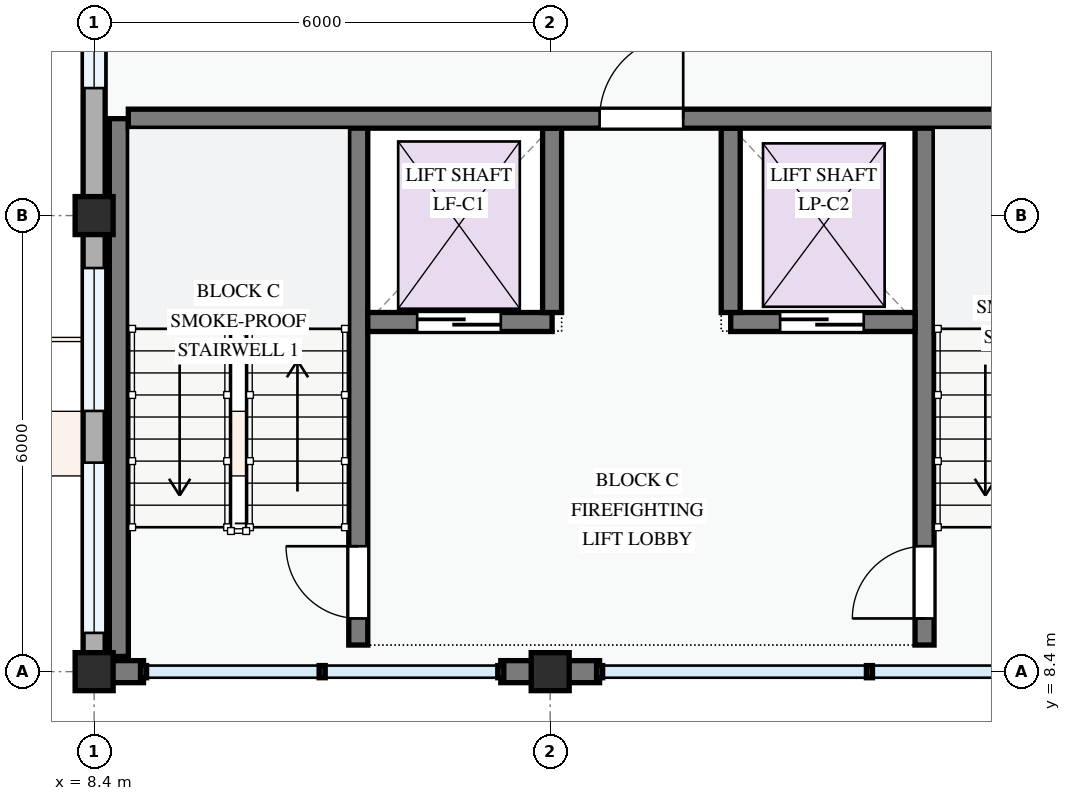
"""IFC4 building model, lengths in metres.
Left out: names, types, materials, properties, quantities, classifications, styles, units other than length and angle.
Written with IfcOpenShell. Run it as: python <this file> out.ifc"""

import sys

from ifc_helpers import new_model, si_unit, direction, frame, frame_2d, origin, origin_2d, place, context, subcontext, project, spatial, rectangle, extrude, element, fill, save


model = new_model("IFC4")
c1 = context("Model", 3, precision=1e-05, world=origin(), true_north=direction((0.0, 1.0)))
c2 = subcontext(c1, "Body", "Model", "MODEL_VIEW")
j1 = project(units=[si_unit("LENGTHUNIT", "METRE"), si_unit("PLANEANGLEUNIT", "RADIAN")], contexts=[c1])
p1 = place(None, origin())
s1 = spatial("IfcSite", under=j1, at=p1, CompositionType="ELEMENT")
p2 = place(p1, origin())
s2 = spatial("IfcBuilding", under=s1, at=p2, CompositionType="ELEMENT")
p3 = place(p2, frame((0.0, 0.0, 21.3)))
s3 = spatial("IfcBuildingStorey", under=s2, at=p3, CompositionType="ELEMENT", Elevation=21.3)
for number, where, z_axis, x_axis in (
    (1, (8.4, 8.4, 0.0), (0.0, 0.0, 1.0), (1.0, 0.0, 0.0)),
    (2, (8.4, 14.4, 0.0), (0.0, 0.0, 1.0), (1.0, 0.0, 0.0)),
    (3, (14.4, 8.4, 0.0), (0.0, 0.0, 1.0), (1.0, 0.0, 0.0)),
):
    element("IfcColumn", number, at=place(p3, frame(where, z_axis=z_axis, x_axis=x_axis)), inside=s3, PredefinedType="COLUMN", context=c2, shape_type="SweptSolid", body=[
        extrude(rectangle(XDim=0.5, YDim=0.5, at=origin_2d()), origin(), (0.0, 0.0, 1.0), 3.3),
    ])
p4 = place(p3, frame((8.4, 22.8, 0.0), z_axis=(0.0, 0.0, 1.0), x_axis=(0.0, -1.0, 0.0)))
e4 = element("IfcWall", 4, at=p4, inside=s3, PredefinedType="STANDARD", context=c2, shape_type="SweptSolid", body=[
    extrude(rectangle(XDim=8.4, YDim=0.29, at=frame_2d((4.2, 0.0))), origin(), (0.0, 0.0, 1.0), 2.345),
])
p5 = place(p4, frame((1.695, 0.0, 0.78)))
e5 = element("IfcOpeningElement", 5, at=p5, cuts=e4, PredefinedType="OPENING", context=c2, shape_type="SweptSolid", body=[
    extrude(rectangle(XDim=1.0, YDim=1.25, at=frame_2d((0.5, 0.625))), frame((0.0, 0.155, 0.0), z_axis=(0.0, -1.0, 0.0), x_axis=(1.0, 0.0, 0.0)), (0.0, 0.0, 1.0), 0.31),
])
p6 = place(p4, frame((4.603, 0.0, 0.78)))
e6 = element("IfcOpeningElement", 6, at=p6, cuts=e4, PredefinedType="OPENING", context=c2, shape_type="SweptSolid", body=[
    extrude(rectangle(XDim=2.12, YDim=1.44, at=frame_2d((1.06, 0.72))), frame((0.0, 0.155, 0.0), z_axis=(0.0, -1.0, 0.0), x_axis=(1.0, 0.0, 0.0)), (0.0, 0.0, 1.0), 0.31),
])
p7 = place(p3, frame((8.4, 14.4, 0.0), z_axis=(0.0, 0.0, 1.0), x_axis=(0.0, -1.0, 0.0)))
e7 = element("IfcWall", 7, at=p7, inside=s3, PredefinedType="STANDARD", context=c2, shape_type="SweptSolid", body=[
    extrude(rectangle(XDim=6.0, YDim=0.29, at=frame_2d((3.0, 0.0))), origin(), (0.0, 0.0, 1.0), 2.445),
])
p8 = place(p7, frame((0.69, 0.0, 0.78)))
e8 = element("IfcOpeningElement", 8, at=p8, cuts=e7, PredefinedType="OPENING", context=c2, shape_type="SweptSolid", body=[
    extrude(rectangle(XDim=1.88, YDim=1.52, at=frame_2d((0.94, 0.76))), frame((0.0, 0.155, 0.0), z_axis=(0.0, -1.0, 0.0), x_axis=(1.0, 0.0, 0.0)), (0.0, 0.0, 1.0), 0.31),
])
p9 = place(p7, frame((3.25, 0.0, 0.78)))
e9 = element("IfcOpeningElement", 9, at=p9, cuts=e7, PredefinedType="OPENING", context=c2, shape_type="SweptSolid", body=[
    extrude(rectangle(XDim=2.24, YDim=1.52, at=frame_2d((1.12, 0.76))), frame((0.0, 0.155, 0.0), z_axis=(0.0, -1.0, 0.0), x_axis=(1.0, 0.0, 0.0)), (0.0, 0.0, 1.0), 0.31),
])
p10 = place(p3, frame((8.547, 8.4, 0.0), z_axis=(0.0, 0.0, 1.0), x_axis=(1.0, 0.0, 0.0)))
e10 = element("IfcWall", 10, at=p10, inside=s3, PredefinedType="STANDARD", context=c2, shape_type="SweptSolid", body=[
    extrude(rectangle(XDim=0.503, YDim=0.29, at=frame_2d((0.251, 0.0))), origin(), (0.0, 0.0, 1.0), 3.04),
])
p11 = place(p3, frame((13.75, 8.4, 0.0), z_axis=(0.0, 0.0, 1.0), x_axis=(1.0, 0.0, 0.0)))
e11 = element("IfcWall", 11, at=p11, inside=s3, PredefinedType="STANDARD", context=c2, shape_type="SweptSolid", body=[
    extrude(rectangle(XDim=0.65, YDim=0.29, at=frame_2d((0.325, 0.0))), origin(), (0.0, 0.0, 1.0), 3.04),
])
p12 = place(p3, frame((14.4, 8.4, 0.0), z_axis=(0.0, 0.0, 1.0), x_axis=(1.0, 0.0, 0.0)))
e12 = element("IfcWall", 12, at=p12, inside=s3, PredefinedType="STANDARD", context=c2, shape_type="SweptSolid", body=[
    extrude(rectangle(XDim=0.65, YDim=0.29, at=frame_2d((0.325, 0.0))), origin(), (0.0, 0.0, 1.0), 3.04),
])
p13 = place(p3, frame((11.875, 8.75, 0.0), z_axis=(0.0, 0.0, 1.0), x_axis=(0.0, 1.0, 0.0)))
e13 = element("IfcWall", 13, at=p13, inside=s3, PredefinedType="SHEAR", context=c2, shape_type="SweptSolid", body=[
    extrude(rectangle(XDim=6.925, YDim=0.25, at=frame_2d((3.462, 0.0))), origin(), (0.0, 0.0, 1.0), 3.0),
])
p14 = place(p13, frame((0.35, 0.0, 0.0)))
e14 = element("IfcOpeningElement", 14, at=p14, cuts=e13, PredefinedType="OPENING", context=c2, shape_type="SweptSolid", body=[
    extrude(rectangle(XDim=0.95, YDim=2.1, at=frame_2d((0.475, 1.05))), frame((0.0, 0.135, 0.0), z_axis=(0.0, -1.0, 0.0), x_axis=(1.0, 0.0, 0.0)), (0.0, 0.0, 1.0), 0.27),
])
p15 = place(p3, frame((8.725, 8.6, 0.0), z_axis=(0.0, 0.0, 1.0), x_axis=(0.0, 1.0, 0.0)))
e15 = element("IfcWall", 15, at=p15, inside=s3, PredefinedType="SHEAR", context=c2, shape_type="SweptSolid", body=[
    extrude(rectangle(XDim=7.075, YDim=0.25, at=frame_2d((3.538, 0.0))), origin(), (0.0, 0.0, 1.0), 3.0),
])
p16 = place(p3, frame((19.325, 8.75, 0.0), z_axis=(0.0, 0.0, 1.0), x_axis=(0.0, 1.0, 0.0)))
e16 = element("IfcWall", 16, at=p16, inside=s3, PredefinedType="SHEAR", context=c2, shape_type="SweptSolid", body=[
    extrude(rectangle(XDim=6.925, YDim=0.25, at=frame_2d((3.462, 0.0))), origin(), (0.0, 0.0, 1.0), 3.0),
])
p17 = place(p16, frame((0.35, 0.0, 0.0)))
e17 = element("IfcOpeningElement", 17, at=p17, cuts=e16, PredefinedType="OPENING", context=c2, shape_type="SweptSolid", body=[
    extrude(rectangle(XDim=0.95, YDim=2.1, at=frame_2d((0.475, 1.05))), frame((0.0, 0.135, 0.0), z_axis=(0.0, -1.0, 0.0), x_axis=(1.0, 0.0, 0.0)), (0.0, 0.0, 1.0), 0.27),
])
p18 = place(p3, frame((12.0, 13.0, 0.0), z_axis=(0.0, 0.0, 1.0), x_axis=(1.0, 0.0, 0.0)))
e18 = element("IfcWall", 18, at=p18, inside=s3, PredefinedType="SHEAR", context=c2, shape_type="SweptSolid", body=[
    extrude(rectangle(XDim=2.425, YDim=0.25, at=frame_2d((1.212, 0.0))), origin(), (0.0, 0.0, 1.0), 3.0),
])
p19 = place(p18, frame((0.65, 0.0, 0.0)))
e19 = element("IfcOpeningElement", 19, at=p19, cuts=e18, PredefinedType="OPENING", context=c2, shape_type="SweptSolid", body=[
    extrude(rectangle(XDim=1.1, YDim=2.15, at=frame_2d((0.55, 1.075))), frame((0.0, 0.135, 0.0), z_axis=(0.0, -1.0, 0.0), x_axis=(1.0, 0.0, 0.0)), (0.0, 0.0, 1.0), 0.27),
])
p20 = place(p3, frame((16.775, 13.0, 0.0), z_axis=(0.0, 0.0, 1.0), x_axis=(1.0, 0.0, 0.0)))
e20 = element("IfcWall", 20, at=p20, inside=s3, PredefinedType="SHEAR", context=c2, shape_type="SweptSolid", body=[
    extrude(rectangle(XDim=2.425, YDim=0.25, at=frame_2d((1.212, 0.0))), origin(), (0.0, 0.0, 1.0), 3.0),
])
p21 = place(p20, frame((0.65, 0.0, 0.0)))
e21 = element("IfcOpeningElement", 21, at=p21, cuts=e20, PredefinedType="OPENING", context=c2, shape_type="SweptSolid", body=[
    extrude(rectangle(XDim=1.1, YDim=2.15, at=frame_2d((0.55, 1.075))), frame((0.0, 0.135, 0.0), z_axis=(0.0, -1.0, 0.0), x_axis=(1.0, 0.0, 0.0)), (0.0, 0.0, 1.0), 0.27),
])
for number, where, z_axis, x_axis in (
    (22, (14.425, 13.125, 0.0), (0.0, 0.0, 1.0), (0.0, 1.0, 0.0)),
    (23, (16.775, 13.125, 0.0), (0.0, 0.0, 1.0), (0.0, 1.0, 0.0)),
):
    element("IfcWall", number, at=place(p3, frame(where, z_axis=z_axis, x_axis=x_axis)), inside=s3, PredefinedType="SHEAR", context=c2, shape_type="SweptSolid", body=[
        extrude(rectangle(XDim=2.425, YDim=0.25, at=frame_2d((1.212, 0.0))), origin(), (0.0, 0.0, 1.0), 3.0),
    ])
p22 = place(p3, frame((8.85, 15.675, 0.0), z_axis=(0.0, 0.0, 1.0), x_axis=(1.0, 0.0, 0.0)))
e24 = element("IfcWall", 24, at=p22, inside=s3, PredefinedType="SHEAR", context=c2, shape_type="SweptSolid", body=[
    extrude(rectangle(XDim=13.5, YDim=0.25, at=frame_2d((6.75, 0.0))), origin(), (0.0, 0.0, 1.0), 3.0),
])
p23 = place(p22, frame((6.2, 0.0, 0.0)))
e25 = element("IfcOpeningElement", 25, at=p23, cuts=e24, PredefinedType="OPENING", context=c2, shape_type="SweptSolid", body=[
    extrude(rectangle(XDim=1.1, YDim=2.15, at=frame_2d((0.55, 1.075))), frame((0.0, 0.135, 0.0), z_axis=(0.0, -1.0, 0.0), x_axis=(1.0, 0.0, 0.0)), (0.0, 0.0, 1.0), 0.27),
])
p24 = place(p6, origin())
e26 = element("IfcWindow", 26, at=p24, inside=s3, PartitioningType="DOUBLE_PANEL_VERTICAL", PredefinedType="WINDOW", context=c2, shape_type="SweptSolid", body=[
    extrude(rectangle(XDim=2.12, YDim=1.44, at=frame_2d((1.06, 0.72))), frame((0.0, 0.03, 0.0), z_axis=(0.0, -1.0, 0.0), x_axis=(1.0, 0.0, 0.0)), (0.0, 0.0, 1.0), 0.06),
])
fill(e6, e26)
p25 = place(p8, origin())
e27 = element("IfcWindow", 27, at=p25, inside=s3, PartitioningType="DOUBLE_PANEL_VERTICAL", PredefinedType="WINDOW", context=c2, shape_type="SweptSolid", body=[
    extrude(rectangle(XDim=1.88, YDim=1.52, at=frame_2d((0.94, 0.76))), frame((0.0, 0.03, 0.0), z_axis=(0.0, -1.0, 0.0), x_axis=(1.0, 0.0, 0.0)), (0.0, 0.0, 1.0), 0.06),
])
fill(e8, e27)
p26 = place(p9, origin())
e28 = element("IfcWindow", 28, at=p26, inside=s3, PartitioningType="DOUBLE_PANEL_VERTICAL", PredefinedType="WINDOW", context=c2, shape_type="SweptSolid", body=[
    extrude(rectangle(XDim=2.24, YDim=1.52, at=frame_2d((1.12, 0.76))), frame((0.0, 0.03, 0.0), z_axis=(0.0, -1.0, 0.0), x_axis=(1.0, 0.0, 0.0)), (0.0, 0.0, 1.0), 0.06),
])
fill(e9, e28)
p27 = place(p14, origin())
e29 = element("IfcDoor", 29, at=p27, inside=s3, OperationType="SINGLE_SWING_RIGHT", PredefinedType="DOOR", context=c2, shape_type="SweptSolid", body=[
    extrude(rectangle(XDim=0.95, YDim=2.1, at=frame_2d((0.475, 1.05))), frame((0.0, 0.025, 0.0), z_axis=(0.0, -1.0, 0.0), x_axis=(1.0, 0.0, 0.0)), (0.0, 0.0, 1.0), 0.05),
])
fill(e14, e29)
p28 = place(p17, origin())
e30 = element("IfcDoor", 30, at=p28, inside=s3, OperationType="SINGLE_SWING_LEFT", PredefinedType="DOOR", context=c2, shape_type="SweptSolid", body=[
    extrude(rectangle(XDim=0.95, YDim=2.1, at=frame_2d((0.475, 1.05))), frame((0.0, 0.025, 0.0), z_axis=(0.0, -1.0, 0.0), x_axis=(1.0, 0.0, 0.0)), (0.0, 0.0, 1.0), 0.05),
])
fill(e17, e30)
p29 = place(p19, origin())
e31 = element("IfcDoor", 31, at=p29, inside=s3, OperationType="SLIDING_TO_LEFT", PredefinedType="DOOR", context=c2, shape_type="SweptSolid", body=[
    extrude(rectangle(XDim=1.1, YDim=2.15, at=frame_2d((0.55, 1.075))), frame((0.0, 0.025, 0.0), z_axis=(0.0, -1.0, 0.0), x_axis=(1.0, 0.0, 0.0)), (0.0, 0.0, 1.0), 0.05),
])
fill(e19, e31)
p30 = place(p21, origin())
e32 = element("IfcDoor", 32, at=p30, inside=s3, OperationType="SLIDING_TO_LEFT", PredefinedType="DOOR", context=c2, shape_type="SweptSolid", body=[
    extrude(rectangle(XDim=1.1, YDim=2.15, at=frame_2d((0.55, 1.075))), frame((0.0, 0.025, 0.0), z_axis=(0.0, -1.0, 0.0), x_axis=(1.0, 0.0, 0.0)), (0.0, 0.0, 1.0), 0.05),
])
fill(e21, e32)
p31 = place(p23, origin())
e33 = element("IfcDoor", 33, at=p31, inside=s3, OperationType="SINGLE_SWING_RIGHT", PredefinedType="DOOR", context=c2, shape_type="SweptSolid", body=[
    extrude(rectangle(XDim=1.1, YDim=2.15, at=frame_2d((0.55, 1.075))), frame((0.0, 0.025, 0.0), z_axis=(0.0, -1.0, 0.0), x_axis=(1.0, 0.0, 0.0)), (0.0, 0.0, 1.0), 0.05),
])
fill(e25, e33)
save(model, sys.argv[1])
